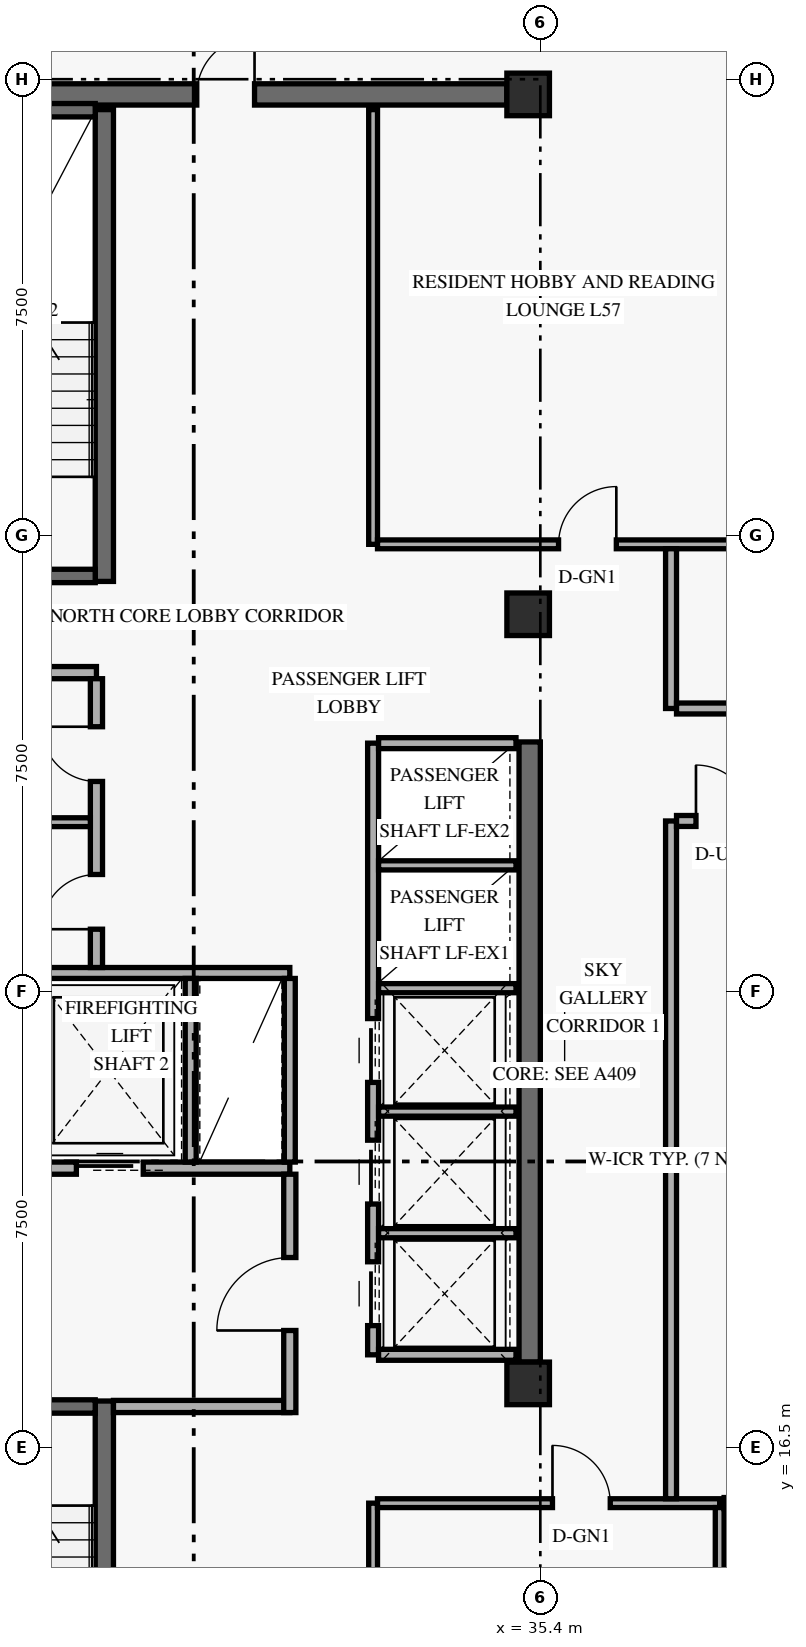
"""IFC4 building model, lengths in metres.
Left out: names, types, materials, properties, quantities, classifications, styles, units other than length and angle.
Written with IfcOpenShell. Run it as: python <this file> out.ifc"""

import sys

from ifc_helpers import new_model, si_unit, direction, frame, frame_2d, origin, origin_2d, place, context, subcontext, project, spatial, rectangle, extrude, element, fill, save


model = new_model("IFC4")
c1 = context("Model", 3, precision=1e-05, world=origin(), true_north=direction((0.0, 1.0)))
c2 = subcontext(c1, "Body", "Model", "MODEL_VIEW")
j1 = project(units=[si_unit("LENGTHUNIT", "METRE"), si_unit("PLANEANGLEUNIT", "RADIAN")], contexts=[c1])
p1 = place(None, origin())
s1 = spatial("IfcSite", under=j1, at=p1, CompositionType="ELEMENT")
p2 = place(p1, origin())
s2 = spatial("IfcBuilding", under=s1, at=p2, CompositionType="ELEMENT")
p3 = place(p2, frame((0.0, 0.0, 220.2)))
s3 = spatial("IfcBuildingStorey", under=s2, at=p3, CompositionType="ELEMENT", Elevation=220.2)
p4 = place(p3, frame((35.225, 17.9, 0.0), z_axis=(0.0, 0.0, 1.0), x_axis=(0.0, 1.0, 0.0)))
e1 = element("IfcWall", 1, at=p4, inside=s3, PredefinedType="SHEAR", context=c2, shape_type="SweptSolid", body=[
    extrude(rectangle(XDim=10.2, YDim=0.35, at=frame_2d((5.1, 0.0))), origin(), (0.0, 0.0, 1.0), 2.821),
])
p5 = place(p3, frame((24.55, 38.75, 0.0), z_axis=(0.0, 0.0, 1.0), x_axis=(1.0, 0.0, 0.0)))
e2 = element("IfcWall", 2, at=p5, inside=s3, PredefinedType="SHEAR", context=c2, shape_type="SweptSolid", body=[
    extrude(rectangle(XDim=10.3, YDim=0.35, at=frame_2d((5.15, 0.0))), origin(), (0.0, 0.0, 1.0), 3.36),
])
p6 = place(p5, frame((5.2, 0.0, 0.0)))
e3 = element("IfcOpeningElement", 3, at=p6, cuts=e2, PredefinedType="OPENING", context=c2, shape_type="SweptSolid", body=[
    extrude(rectangle(XDim=0.95, YDim=2.15, at=frame_2d((0.475, 1.075))), frame((0.0, 0.185, 0.0), z_axis=(0.0, -1.0, 0.0), x_axis=(1.0, 0.0, 0.0)), (0.0, 0.0, 1.0), 0.37),
])
p7 = place(p3, frame((28.23, 9.5, 0.0), z_axis=(0.0, 0.0, 1.0), x_axis=(0.0, 1.0, 0.0)))
e4 = element("IfcWall", 4, at=p7, inside=s3, PredefinedType="SHEAR", context=c2, shape_type="SweptSolid", body=[
    extrude(rectangle(XDim=7.76, YDim=0.3, at=frame_2d((3.88, 0.0))), origin(), (0.0, 0.0, 1.0), 3.36),
])
p8 = place(p3, frame((24.92, 17.17, 0.0), z_axis=(0.0, 0.0, 1.0), x_axis=(1.0, 0.0, 0.0)))
e5 = element("IfcWall", 5, at=p8, inside=s3, PredefinedType="SHEAR", context=c2, shape_type="SweptSolid", body=[
    extrude(rectangle(XDim=3.16, YDim=0.22, at=frame_2d((1.58, 0.0))), origin(), (0.0, 0.0, 1.0), 3.36),
])
p9 = place(p8, frame((0.78, 0.0, 0.0)))
e6 = element("IfcOpeningElement", 6, at=p9, cuts=e5, PredefinedType="OPENING", context=c2, shape_type="SweptSolid", body=[
    extrude(rectangle(XDim=1.05, YDim=2.15, at=frame_2d((0.525, 1.075))), frame((0.0, 0.12, 0.0), z_axis=(0.0, -1.0, 0.0), x_axis=(1.0, 0.0, 0.0)), (0.0, 0.0, 1.0), 0.24),
])
p10 = place(p3, frame((28.23, 30.74, 0.0), z_axis=(0.0, 0.0, 1.0), x_axis=(0.0, 1.0, 0.0)))
e7 = element("IfcWall", 7, at=p10, inside=s3, PredefinedType="SHEAR", context=c2, shape_type="SweptSolid", body=[
    extrude(rectangle(XDim=7.76, YDim=0.3, at=frame_2d((3.88, 0.0))), origin(), (0.0, 0.0, 1.0), 3.36),
])
p11 = place(p3, frame((24.92, 30.83, 0.0), z_axis=(0.0, 0.0, 1.0), x_axis=(1.0, 0.0, 0.0)))
e8 = element("IfcWall", 8, at=p11, inside=s3, PredefinedType="SHEAR", context=c2, shape_type="SweptSolid", body=[
    extrude(rectangle(XDim=3.16, YDim=0.22, at=frame_2d((1.58, 0.0))), origin(), (0.0, 0.0, 1.0), 3.36),
])
p12 = place(p11, frame((0.78, 0.0, 0.0)))
e9 = element("IfcOpeningElement", 9, at=p12, cuts=e8, PredefinedType="OPENING", context=c2, shape_type="SweptSolid", body=[
    extrude(rectangle(XDim=1.05, YDim=2.15, at=frame_2d((0.525, 1.075))), frame((0.0, 0.12, 0.0), z_axis=(0.0, -1.0, 0.0), x_axis=(1.0, 0.0, 0.0)), (0.0, 0.0, 1.0), 0.24),
])
p13 = place(p3, frame((24.92, 38.49, 0.0), z_axis=(0.0, 0.0, 1.0), x_axis=(1.0, 0.0, 0.0)))
e10 = element("IfcWall", 10, at=p13, inside=s3, PredefinedType="SHEAR", context=c2, shape_type="SweptSolid", body=[
    extrude(rectangle(XDim=3.16, YDim=0.22, at=frame_2d((1.58, 0.0))), origin(), (0.0, 0.0, 1.0), 3.36),
])
for number, where, z_axis, x_axis in (
    (11, (35.2, 17.55, 0.0), (0.0, 0.0, 1.0), (1.0, 0.0, 0.0)),
    (12, (35.2, 30.2, 0.0), (0.0, 0.0, 1.0), (1.0, 0.0, 0.0)),
    (13, (35.2, 38.75, 0.0), (0.0, 0.0, 1.0), (1.0, 0.0, 0.0)),
):
    element("IfcColumn", number, at=place(p3, frame(where, z_axis=z_axis, x_axis=x_axis)), inside=s3, PredefinedType="COLUMN", context=c2, shape_type="SweptSolid", body=[
        extrude(rectangle(XDim=0.7, YDim=0.7, at=origin_2d()), origin(), (0.0, 0.0, 1.0), 3.6),
    ])
p14 = place(p3, frame((24.45, 21.09, 0.0), z_axis=(0.0, 0.0, 1.0), x_axis=(1.0, 0.0, 0.0)))
e14 = element("IfcWall", 14, at=p14, inside=s3, PredefinedType="STANDARD", context=c2, shape_type="SweptSolid", body=[
    extrude(rectangle(XDim=6.83, YDim=0.2, at=frame_2d((3.415, 0.0))), origin(), (0.0, 0.0, 1.0), 3.36),
])
p15 = place(p14, frame((0.72, 0.0, 0.0)))
e15 = element("IfcOpeningElement", 15, at=p15, cuts=e14, PredefinedType="OPENING", context=c2, shape_type="SweptSolid", body=[
    extrude(rectangle(XDim=1.1, YDim=2.2, at=frame_2d((0.55, 1.1))), frame((0.0, 0.11, 0.0), z_axis=(0.0, -1.0, 0.0), x_axis=(1.0, 0.0, 0.0)), (0.0, 0.0, 1.0), 0.22),
])
p16 = place(p14, frame((3.32, 0.0, 0.0)))
e16 = element("IfcOpeningElement", 16, at=p16, cuts=e14, PredefinedType="OPENING", context=c2, shape_type="SweptSolid", body=[
    extrude(rectangle(XDim=1.1, YDim=2.2, at=frame_2d((0.55, 1.1))), frame((0.0, 0.11, 0.0), z_axis=(0.0, -1.0, 0.0), x_axis=(1.0, 0.0, 0.0)), (0.0, 0.0, 1.0), 0.22),
])
p17 = place(p3, frame((28.38, 17.17, 0.0), z_axis=(0.0, 0.0, 1.0), x_axis=(1.0, 0.0, 0.0)))
e17 = element("IfcWall", 17, at=p17, inside=s3, PredefinedType="STANDARD", context=c2, shape_type="SweptSolid", body=[
    extrude(rectangle(XDim=2.9, YDim=0.2, at=frame_2d((1.45, 0.0))), origin(), (0.0, 0.0, 1.0), 3.36),
])
p18 = place(p3, frame((31.28, 17.07, 0.0), z_axis=(0.0, 0.0, 1.0), x_axis=(0.0, 1.0, 0.0)))
e18 = element("IfcWall", 18, at=p18, inside=s3, PredefinedType="STANDARD", context=c2, shape_type="SweptSolid", body=[
    extrude(rectangle(XDim=3.92, YDim=0.2, at=frame_2d((1.96, 0.0))), origin(), (0.0, 0.0, 1.0), 2.803),
])
p19 = place(p18, frame((1.35, 0.0, 0.0)))
e19 = element("IfcOpeningElement", 19, at=p19, cuts=e18, PredefinedType="OPENING", context=c2, shape_type="SweptSolid", body=[
    extrude(rectangle(XDim=1.2, YDim=2.15, at=frame_2d((0.6, 1.075))), frame((0.0, 0.11, 0.0), z_axis=(0.0, -1.0, 0.0), x_axis=(1.0, 0.0, 0.0)), (0.0, 0.0, 1.0), 0.22),
])
p20 = place(p3, frame((24.45, 24.3, 0.0), z_axis=(0.0, 0.0, 1.0), x_axis=(1.0, 0.0, 0.0)))
e20 = element("IfcWall", 20, at=p20, inside=s3, PredefinedType="STANDARD", context=c2, shape_type="SweptSolid", body=[
    extrude(rectangle(XDim=6.83, YDim=0.18, at=frame_2d((3.415, 0.0))), origin(), (0.0, 0.0, 1.0), 3.36),
])
for number, where, z_axis, x_axis in (
    (21, (29.65, 21.19, 0.0), (0.0, 0.0, 1.0), (0.0, 1.0, 0.0)),
    (22, (31.28, 21.19, 0.0), (0.0, 0.0, 1.0), (0.0, 1.0, 0.0)),
):
    element("IfcWall", number, at=place(p3, frame(where, z_axis=z_axis, x_axis=x_axis)), inside=s3, PredefinedType="STANDARD", context=c2, shape_type="SweptSolid", body=[
        extrude(rectangle(XDim=3.02, YDim=0.18, at=frame_2d((1.51, 0.0))), origin(), (0.0, 0.0, 1.0), 3.36),
    ])
p21 = place(p3, frame((24.45, 29.24, 0.0), z_axis=(0.0, 0.0, 1.0), x_axis=(1.0, 0.0, 0.0)))
e23 = element("IfcWall", 23, at=p21, inside=s3, PredefinedType="STANDARD", context=c2, shape_type="SweptSolid", body=[
    extrude(rectangle(XDim=3.65, YDim=0.2, at=frame_2d((1.825, 0.0))), origin(), (0.0, 0.0, 1.0), 3.36),
])
p22 = place(p3, frame((28.1, 24.39, 0.0), z_axis=(0.0, 0.0, 1.0), x_axis=(0.0, 1.0, 0.0)))
e24 = element("IfcWall", 24, at=p22, inside=s3, PredefinedType="STANDARD", context=c2, shape_type="SweptSolid", body=[
    extrude(rectangle(XDim=4.75, YDim=0.2, at=frame_2d((2.375, 0.0))), origin(), (0.0, 0.0, 1.0), 3.36),
])
p23 = place(p22, frame((0.63, 0.0, 0.0)))
e25 = element("IfcOpeningElement", 25, at=p23, cuts=e24, PredefinedType="OPENING", context=c2, shape_type="SweptSolid", body=[
    extrude(rectangle(XDim=0.9, YDim=2.1, at=frame_2d((0.45, 1.05))), frame((0.0, 0.11, 0.0), z_axis=(0.0, -1.0, 0.0), x_axis=(1.0, 0.0, 0.0)), (0.0, 0.0, 1.0), 0.22),
])
p24 = place(p22, frame((3.06, 0.0, 0.0)))
e26 = element("IfcOpeningElement", 26, at=p24, cuts=e24, PredefinedType="OPENING", context=c2, shape_type="SweptSolid", body=[
    extrude(rectangle(XDim=0.9, YDim=2.1, at=frame_2d((0.45, 1.05))), frame((0.0, 0.11, 0.0), z_axis=(0.0, -1.0, 0.0), x_axis=(1.0, 0.0, 0.0)), (0.0, 0.0, 1.0), 0.22),
])
p25 = place(p3, frame((24.45, 26.78, 0.0), z_axis=(0.0, 0.0, 1.0), x_axis=(1.0, 0.0, 0.0)))
e27 = element("IfcWall", 27, at=p25, inside=s3, PredefinedType="PARTITIONING", context=c2, shape_type="SweptSolid", body=[
    extrude(rectangle(XDim=3.55, YDim=0.145, at=frame_2d((1.775, 0.0))), origin(), (0.0, 0.0, 1.0), 3.36),
])
p26 = place(p3, frame((32.65, 18.02, 0.0), z_axis=(0.0, 0.0, 1.0), x_axis=(0.0, 1.0, 0.0)))
e28 = element("IfcWall", 28, at=p26, inside=s3, PredefinedType="STANDARD", context=c2, shape_type="SweptSolid", body=[
    extrude(rectangle(XDim=10.06, YDim=0.18, at=frame_2d((5.03, 0.0))), origin(), (0.0, 0.0, 1.0), 3.36),
])
p27 = place(p26, frame((0.48, 0.0, 0.0)))
e29 = element("IfcOpeningElement", 29, at=p27, cuts=e28, PredefinedType="OPENING", context=c2, shape_type="SweptSolid", body=[
    extrude(rectangle(XDim=1.05, YDim=2.2, at=frame_2d((0.525, 1.1))), frame((0.0, 0.1, 0.0), z_axis=(0.0, -1.0, 0.0), x_axis=(1.0, 0.0, 0.0)), (0.0, 0.0, 1.0), 0.2),
])
p28 = place(p26, frame((2.48, 0.0, 0.0)))
e30 = element("IfcOpeningElement", 30, at=p28, cuts=e28, PredefinedType="OPENING", context=c2, shape_type="SweptSolid", body=[
    extrude(rectangle(XDim=1.05, YDim=2.2, at=frame_2d((0.525, 1.1))), frame((0.0, 0.1, 0.0), z_axis=(0.0, -1.0, 0.0), x_axis=(1.0, 0.0, 0.0)), (0.0, 0.0, 1.0), 0.2),
])
p29 = place(p26, frame((4.48, 0.0, 0.0)))
e31 = element("IfcOpeningElement", 31, at=p29, cuts=e28, PredefinedType="OPENING", context=c2, shape_type="SweptSolid", body=[
    extrude(rectangle(XDim=1.05, YDim=2.2, at=frame_2d((0.525, 1.1))), frame((0.0, 0.1, 0.0), z_axis=(0.0, -1.0, 0.0), x_axis=(1.0, 0.0, 0.0)), (0.0, 0.0, 1.0), 0.2),
])
for number, where, z_axis, x_axis in (
    (32, (32.74, 18.02, 0.0), (0.0, 0.0, 1.0), (1.0, 0.0, 0.0)),
    (33, (32.74, 28.08, 0.0), (0.0, 0.0, 1.0), (1.0, 0.0, 0.0)),
):
    element("IfcWall", number, at=place(p3, frame(where, z_axis=z_axis, x_axis=x_axis)), inside=s3, PredefinedType="STANDARD", context=c2, shape_type="SweptSolid", body=[
        extrude(rectangle(XDim=2.26, YDim=0.18, at=frame_2d((1.13, 0.0))), origin(), (0.0, 0.0, 1.0), 3.36),
    ])
for number, where, z_axis, x_axis in (
    (34, (32.74, 20.02, 0.0), (0.0, 0.0, 1.0), (1.0, 0.0, 0.0)),
    (35, (32.74, 22.02, 0.0), (0.0, 0.0, 1.0), (1.0, 0.0, 0.0)),
    (36, (32.74, 24.05, 0.0), (0.0, 0.0, 1.0), (1.0, 0.0, 0.0)),
    (37, (32.74, 26.07, 0.0), (0.0, 0.0, 1.0), (1.0, 0.0, 0.0)),
):
    element("IfcWall", number, at=place(p3, frame(where, z_axis=z_axis, x_axis=x_axis)), inside=s3, PredefinedType="STANDARD", context=c2, shape_type="SweptSolid", body=[
        extrude(rectangle(XDim=2.26, YDim=0.15, at=frame_2d((1.13, 0.0))), origin(), (0.0, 0.0, 1.0), 3.36),
    ])
p30 = place(p3, frame((32.65, 9.5, 0.0), z_axis=(0.0, 0.0, 1.0), x_axis=(0.0, 1.0, 0.0)))
e38 = element("IfcWall", 38, at=p30, inside=s3, PredefinedType="PARTITIONING", context=c2, shape_type="SweptSolid", body=[
    extrude(rectangle(XDim=6.08, YDim=0.145, at=frame_2d((3.04, 0.0))), origin(), (0.0, 0.0, 1.0), 3.36),
])
p31 = place(p3, frame((32.722, 15.58, 0.0), z_axis=(0.0, 0.0, 1.0), x_axis=(1.0, 0.0, 0.0)))
e39 = element("IfcWall", 39, at=p31, inside=s3, PredefinedType="PARTITIONING", context=c2, shape_type="SweptSolid", body=[
    extrude(rectangle(XDim=5.628, YDim=0.145, at=frame_2d((2.814, 0.0))), origin(), (0.0, 0.0, 1.0), 2.803),
])
p32 = place(p31, frame((2.877, 0.0, 0.0)))
e40 = element("IfcOpeningElement", 40, at=p32, cuts=e39, PredefinedType="OPENING", context=c2, shape_type="SweptSolid", body=[
    extrude(rectangle(XDim=0.95, YDim=2.15, at=frame_2d((0.475, 1.075))), frame((0.0, 0.083, 0.0), z_axis=(0.0, -1.0, 0.0), x_axis=(1.0, 0.0, 0.0)), (0.0, 0.0, 1.0), 0.165),
])
p33 = place(p3, frame((38.35, 9.25, 0.0), z_axis=(0.0, 0.0, 1.0), x_axis=(0.0, 1.0, 0.0)))
e41 = element("IfcWall", 41, at=p33, inside=s3, PredefinedType="PARTITIONING", context=c2, shape_type="SweptSolid", body=[
    extrude(rectangle(XDim=6.258, YDim=0.145, at=frame_2d((3.129, 0.0))), origin(), (0.0, 0.0, 1.0), 2.803),
])
p34 = place(p3, frame((32.65, 31.35, 0.0), z_axis=(0.0, 0.0, 1.0), x_axis=(0.0, 1.0, 0.0)))
e42 = element("IfcWall", 42, at=p34, inside=s3, PredefinedType="PARTITIONING", context=c2, shape_type="SweptSolid", body=[
    extrude(rectangle(XDim=7.15, YDim=0.145, at=frame_2d((3.575, 0.0))), origin(), (0.0, 0.0, 1.0), 3.36),
])
p35 = place(p3, frame((32.722, 31.35, 0.0), z_axis=(0.0, 0.0, 1.0), x_axis=(1.0, 0.0, 0.0)))
e43 = element("IfcWall", 43, at=p35, inside=s3, PredefinedType="PARTITIONING", context=c2, shape_type="SweptSolid", body=[
    extrude(rectangle(XDim=6.177, YDim=0.145, at=frame_2d((3.089, 0.0))), origin(), (0.0, 0.0, 1.0), 2.803),
])
p36 = place(p35, frame((2.978, 0.0, 0.0)))
e44 = element("IfcOpeningElement", 44, at=p36, cuts=e43, PredefinedType="OPENING", context=c2, shape_type="SweptSolid", body=[
    extrude(rectangle(XDim=0.95, YDim=2.15, at=frame_2d((0.475, 1.075))), frame((0.0, 0.083, 0.0), z_axis=(0.0, -1.0, 0.0), x_axis=(1.0, 0.0, 0.0)), (0.0, 0.0, 1.0), 0.165),
])
p37 = place(p3, frame((37.55, 15.653, 0.0), z_axis=(0.0, 0.0, 1.0), x_axis=(0.0, 1.0, 0.0)))
e45 = element("IfcWall", 45, at=p37, inside=s3, PredefinedType="STANDARD", context=c2, shape_type="SweptSolid", body=[
    extrude(rectangle(XDim=11.147, YDim=0.18, at=frame_2d((5.574, 0.0))), origin(), (0.0, 0.0, 1.0), 2.803),
])
p38 = place(p3, frame((37.55, 28.65, 0.0), z_axis=(0.0, 0.0, 1.0), x_axis=(0.0, 1.0, 0.0)))
e46 = element("IfcWall", 46, at=p38, inside=s3, PredefinedType="STANDARD", context=c2, shape_type="SweptSolid", body=[
    extrude(rectangle(XDim=2.628, YDim=0.18, at=frame_2d((1.314, 0.0))), origin(), (0.0, 0.0, 1.0), 2.803),
])
p39 = place(p3, frame((37.64, 26.8, 0.0), z_axis=(0.0, 0.0, 1.0), x_axis=(1.0, 0.0, 0.0)))
e47 = element("IfcWall", 47, at=p39, inside=s3, PredefinedType="STANDARD", context=c2, shape_type="SweptSolid", body=[
    extrude(rectangle(XDim=15.303, YDim=0.18, at=frame_2d((7.651, 0.0))), origin(), (0.0, 0.0, 1.0), 2.803),
])
p40 = place(p39, frame((0.32, 0.0, 0.0)))
e48 = element("IfcOpeningElement", 48, at=p40, cuts=e47, PredefinedType="OPENING", context=c2, shape_type="SweptSolid", body=[
    extrude(rectangle(XDim=0.92, YDim=2.15, at=frame_2d((0.46, 1.075))), frame((0.0, 0.1, 0.0), z_axis=(0.0, -1.0, 0.0), x_axis=(1.0, 0.0, 0.0)), (0.0, 0.0, 1.0), 0.2),
])
p41 = place(p3, frame((37.64, 28.65, 0.0), z_axis=(0.0, 0.0, 1.0), x_axis=(1.0, 0.0, 0.0)))
e49 = element("IfcWall", 49, at=p41, inside=s3, PredefinedType="STANDARD", context=c2, shape_type="SweptSolid", body=[
    extrude(rectangle(XDim=15.303, YDim=0.18, at=frame_2d((7.651, 0.0))), origin(), (0.0, 0.0, 1.0), 2.803),
])
p42 = place(p3, frame((38.423, 15.58, 0.0), z_axis=(0.0, 0.0, 1.0), x_axis=(1.0, 0.0, 0.0)))
e50 = element("IfcWall", 50, at=p42, inside=s3, PredefinedType="PARTITIONING", context=c2, shape_type="SweptSolid", body=[
    extrude(rectangle(XDim=14.52, YDim=0.185, at=frame_2d((7.26, 0.0))), origin(), (0.0, 0.0, 1.0), 2.803),
])
p43 = place(p16, origin())
e51 = element("IfcDoor", 51, at=p43, inside=s3, OperationType="SLIDING_TO_LEFT", PredefinedType="DOOR", context=c2, shape_type="SweptSolid", body=[
    extrude(rectangle(XDim=1.1, YDim=2.2, at=frame_2d((0.55, 1.1))), frame((0.0, 0.025, 0.0), z_axis=(0.0, -1.0, 0.0), x_axis=(1.0, 0.0, 0.0)), (0.0, 0.0, 1.0), 0.05),
])
fill(e16, e51)
p44 = place(p19, origin())
e52 = element("IfcDoor", 52, at=p44, inside=s3, OperationType="SINGLE_SWING_LEFT", PredefinedType="DOOR", context=c2, shape_type="SweptSolid", body=[
    extrude(rectangle(XDim=1.2, YDim=2.15, at=frame_2d((0.6, 1.075))), frame((0.0, 0.025, 0.0), z_axis=(0.0, -1.0, 0.0), x_axis=(1.0, 0.0, 0.0)), (0.0, 0.0, 1.0), 0.05),
])
fill(e19, e52)
p45 = place(p23, origin())
e53 = element("IfcDoor", 53, at=p45, inside=s3, OperationType="SINGLE_SWING_LEFT", PredefinedType="DOOR", context=c2, shape_type="SweptSolid", body=[
    extrude(rectangle(XDim=0.9, YDim=2.1, at=frame_2d((0.45, 1.05))), frame((0.0, 0.025, 0.0), z_axis=(0.0, -1.0, 0.0), x_axis=(1.0, 0.0, 0.0)), (0.0, 0.0, 1.0), 0.05),
])
fill(e25, e53)
p46 = place(p24, origin())
e54 = element("IfcDoor", 54, at=p46, inside=s3, OperationType="SINGLE_SWING_RIGHT", PredefinedType="DOOR", context=c2, shape_type="SweptSolid", body=[
    extrude(rectangle(XDim=0.9, YDim=2.1, at=frame_2d((0.45, 1.05))), frame((0.0, 0.025, 0.0), z_axis=(0.0, -1.0, 0.0), x_axis=(1.0, 0.0, 0.0)), (0.0, 0.0, 1.0), 0.05),
])
fill(e26, e54)
p47 = place(p27, origin())
e55 = element("IfcDoor", 55, at=p47, inside=s3, OperationType="SLIDING_TO_LEFT", PredefinedType="DOOR", context=c2, shape_type="SweptSolid", body=[
    extrude(rectangle(XDim=1.05, YDim=2.2, at=frame_2d((0.525, 1.1))), frame((0.0, 0.025, 0.0), z_axis=(0.0, -1.0, 0.0), x_axis=(1.0, 0.0, 0.0)), (0.0, 0.0, 1.0), 0.05),
])
fill(e29, e55)
p48 = place(p28, origin())
e56 = element("IfcDoor", 56, at=p48, inside=s3, OperationType="SLIDING_TO_LEFT", PredefinedType="DOOR", context=c2, shape_type="SweptSolid", body=[
    extrude(rectangle(XDim=1.05, YDim=2.2, at=frame_2d((0.525, 1.1))), frame((0.0, 0.025, 0.0), z_axis=(0.0, -1.0, 0.0), x_axis=(1.0, 0.0, 0.0)), (0.0, 0.0, 1.0), 0.05),
])
fill(e30, e56)
p49 = place(p29, origin())
e57 = element("IfcDoor", 57, at=p49, inside=s3, OperationType="SLIDING_TO_LEFT", PredefinedType="DOOR", context=c2, shape_type="SweptSolid", body=[
    extrude(rectangle(XDim=1.05, YDim=2.2, at=frame_2d((0.525, 1.1))), frame((0.0, 0.025, 0.0), z_axis=(0.0, -1.0, 0.0), x_axis=(1.0, 0.0, 0.0)), (0.0, 0.0, 1.0), 0.05),
])
fill(e31, e57)
p50 = place(p32, origin())
e58 = element("IfcDoor", 58, at=p50, inside=s3, OperationType="SINGLE_SWING_LEFT", PredefinedType="DOOR", context=c2, shape_type="SweptSolid", body=[
    extrude(rectangle(XDim=0.95, YDim=2.15, at=frame_2d((0.475, 1.075))), frame((0.0, 0.025, 0.0), z_axis=(0.0, -1.0, 0.0), x_axis=(1.0, 0.0, 0.0)), (0.0, 0.0, 1.0), 0.05),
])
fill(e40, e58)
p51 = place(p36, origin())
e59 = element("IfcDoor", 59, at=p51, inside=s3, OperationType="SINGLE_SWING_RIGHT", PredefinedType="DOOR", context=c2, shape_type="SweptSolid", body=[
    extrude(rectangle(XDim=0.95, YDim=2.15, at=frame_2d((0.475, 1.075))), frame((0.0, 0.025, 0.0), z_axis=(0.0, -1.0, 0.0), x_axis=(1.0, 0.0, 0.0)), (0.0, 0.0, 1.0), 0.05),
])
fill(e44, e59)
p52 = place(p6, origin())
e60 = element("IfcDoor", 60, at=p52, inside=s3, OperationType="SINGLE_SWING_RIGHT", PredefinedType="DOOR", context=c2, shape_type="SweptSolid", body=[
    extrude(rectangle(XDim=0.95, YDim=2.15, at=frame_2d((0.475, 1.075))), frame((0.0, 0.025, 0.0), z_axis=(0.0, -1.0, 0.0), x_axis=(1.0, 0.0, 0.0)), (0.0, 0.0, 1.0), 0.05),
])
fill(e3, e60)
p53 = place(p40, origin())
e61 = element("IfcDoor", 61, at=p53, inside=s3, OperationType="SINGLE_SWING_LEFT", PredefinedType="DOOR", context=c2, shape_type="SweptSolid", body=[
    extrude(rectangle(XDim=0.92, YDim=2.15, at=frame_2d((0.46, 1.075))), frame((0.0, 0.025, 0.0), z_axis=(0.0, -1.0, 0.0), x_axis=(1.0, 0.0, 0.0)), (0.0, 0.0, 1.0), 0.05),
])
fill(e48, e61)
save(model, sys.argv[1])
